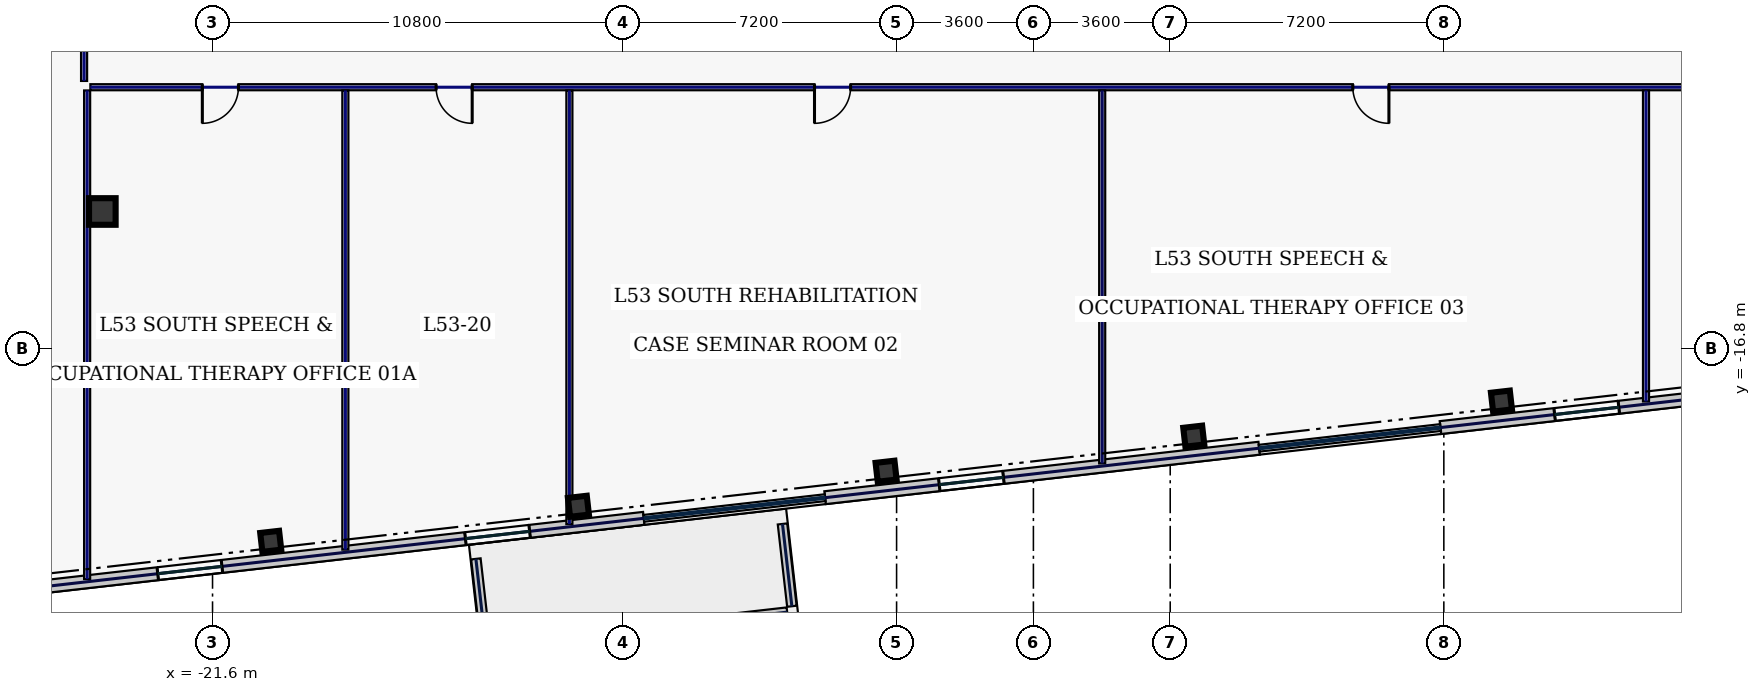
"""IFC4 building model, lengths in metres.
Left out: names, types, materials, properties, quantities, classifications, styles, units other than length and angle.
Written with IfcOpenShell. Run it as: python <this file> out.ifc"""

import sys

from ifc_helpers import new_model, si_unit, direction, frame, frame_2d, origin, origin_2d, place, context, subcontext, project, spatial, rectangle, hollow_rectangle, extrude, element, fill, save


model = new_model("IFC4")
c1 = context("Model", 3, precision=1e-05, world=origin(), true_north=direction((0.0, 1.0)))
c2 = subcontext(c1, "Body", "Model", "MODEL_VIEW")
j1 = project(units=[si_unit("LENGTHUNIT", "METRE"), si_unit("PLANEANGLEUNIT", "RADIAN")], contexts=[c1])
p1 = place(None, origin())
s1 = spatial("IfcSite", under=j1, at=p1, CompositionType="ELEMENT")
p2 = place(p1, origin())
s2 = spatial("IfcBuilding", under=s1, at=p2, CompositionType="ELEMENT")
p3 = place(p2, frame((0.0, 0.0, 230.2)))
s3 = spatial("IfcBuildingStorey", under=s2, at=p3, CompositionType="ELEMENT", Elevation=230.2)
p4 = place(p3, frame((-24.5, -13.2, 0.0), z_axis=(0.0, 0.0, 1.0), x_axis=(1.0, 0.0, 0.0)))
e1 = element("IfcColumn", 1, at=p4, inside=s3, PredefinedType="COLUMN", context=c2, shape_type="SweptSolid", body=[
    extrude(hollow_rectangle(XDim=0.7, YDim=0.7, WallThickness=0.032, at=origin_2d()), origin(), (0.0, 0.0, 1.0), 3.74),
])
for number, where, z_axis, x_axis in (
    (2, (-20.069, -21.88, 0.0), (0.0, 0.0, 1.0), (0.994, 0.113, 0.0)),
    (3, (-11.972, -20.958, 0.0), (0.0, 0.0, 1.0), (0.994, 0.113, 0.0)),
    (4, (-3.876, -20.035, 0.0), (0.0, 0.0, 1.0), (0.994, 0.113, 0.0)),
    (5, (4.22, -19.113, 0.0), (0.0, 0.0, 1.0), (0.994, 0.113, 0.0)),
    (6, (12.316, -18.19, 0.0), (0.0, 0.0, 1.0), (0.994, 0.113, 0.0)),
):
    element("IfcColumn", number, at=place(p3, frame(where, z_axis=z_axis, x_axis=x_axis)), inside=s3, PredefinedType="COLUMN", context=c2, shape_type="SweptSolid", body=[
        extrude(hollow_rectangle(XDim=0.5, YDim=0.5, WallThickness=0.025, at=origin_2d()), origin(), (0.0, 0.0, 1.0), 3.74),
    ])
p5 = place(p3, frame((-14.67, -22.342, 0.0), z_axis=(0.0, 0.0, 1.0), x_axis=(0.113221265394, -0.993569798787, 0.0)))
e7 = element("IfcWall", 7, at=p5, inside=s3, PredefinedType="PARAPET", context=c2, shape_type="SweptSolid", body=[
    extrude(rectangle(XDim=2.18, YDim=0.25, at=frame_2d((1.09, 0.0))), origin(), (0.0, 0.0, 1.0), 1.15),
])
p6 = place(p3, frame((-14.268, -24.631, 0.0), z_axis=(0.0, 0.0, 1.0), x_axis=(0.993572659553, 0.11319615801, 0.0)))
e8 = element("IfcWall", 8, at=p6, inside=s3, PredefinedType="PARAPET", context=c2, shape_type="SweptSolid", body=[
    extrude(rectangle(XDim=7.84, YDim=0.25, at=frame_2d((3.92, 0.0))), origin(), (0.0, 0.0, 1.0), 1.15),
])
p7 = place(p3, frame((-6.355, -23.589, 0.0), z_axis=(0.0, 0.0, 1.0), x_axis=(-0.113221265394, 0.993569798787, 0.0)))
e9 = element("IfcWall", 9, at=p7, inside=s3, PredefinedType="PARAPET", context=c2, shape_type="SweptSolid", body=[
    extrude(rectangle(XDim=2.18, YDim=0.25, at=frame_2d((1.09, 0.0))), origin(), (0.0, 0.0, 1.0), 1.15),
])
p8 = place(p3, frame((-28.783, -23.386, 0.0), z_axis=(0.0, 0.0, 1.0), x_axis=(0.993572271362, 0.113199565282, 0.0)))
e10 = element("IfcWall", 10, at=p8, inside=s3, PredefinedType="STANDARD", context=c2, shape_type="SweptSolid", body=[
    extrude(rectangle(XDim=18.651, YDim=0.34, at=frame_2d((9.326, 0.0))), origin(), (0.0, 0.0, 1.0), 3.74),
])
p9 = place(p8, frame((2.03, 0.0, 0.88)))
e11 = element("IfcOpeningElement", 11, at=p9, cuts=e10, PredefinedType="OPENING", context=c2, shape_type="SweptSolid", body=[
    extrude(rectangle(XDim=0.85, YDim=1.85, at=frame_2d((0.425, 0.925))), frame((0.0, 0.18, 0.0), z_axis=(0.0, -1.0, 0.0), x_axis=(1.0, 0.0, 0.0)), (0.0, 0.0, 1.0), 0.36),
])
p10 = place(p8, frame((5.779, 0.0, 0.88)))
e12 = element("IfcOpeningElement", 12, at=p10, cuts=e10, PredefinedType="OPENING", context=c2, shape_type="SweptSolid", body=[
    extrude(rectangle(XDim=1.7, YDim=1.95, at=frame_2d((0.85, 0.975))), frame((0.0, 0.18, 0.0), z_axis=(0.0, -1.0, 0.0), x_axis=(1.0, 0.0, 0.0)), (0.0, 0.0, 1.0), 0.36),
])
p11 = place(p8, frame((13.927, 0.0, 0.88)))
e13 = element("IfcOpeningElement", 13, at=p11, cuts=e10, PredefinedType="OPENING", context=c2, shape_type="SweptSolid", body=[
    extrude(rectangle(XDim=1.7, YDim=1.95, at=frame_2d((0.85, 0.975))), frame((0.0, 0.18, 0.0), z_axis=(0.0, -1.0, 0.0), x_axis=(1.0, 0.0, 0.0)), (0.0, 0.0, 1.0), 0.36),
])
p12 = place(p3, frame((-5.482, -20.731, 0.0), z_axis=(0.0, 0.0, 1.0), x_axis=(0.993571968199, 0.113202226169, 0.0)))
e14 = element("IfcWall", 14, at=p12, inside=s3, PredefinedType="STANDARD", context=c2, shape_type="SweptSolid", body=[
    extrude(rectangle(XDim=11.497, YDim=0.34, at=frame_2d((5.749, 0.0))), origin(), (0.0, 0.0, 1.0), 3.74),
])
p13 = place(p12, frame((3.024, 0.0, 0.88)))
e15 = element("IfcOpeningElement", 15, at=p13, cuts=e14, PredefinedType="OPENING", context=c2, shape_type="SweptSolid", body=[
    extrude(rectangle(XDim=1.7, YDim=1.95, at=frame_2d((0.85, 0.975))), frame((0.0, 0.18, 0.0), z_axis=(0.0, -1.0, 0.0), x_axis=(1.0, 0.0, 0.0)), (0.0, 0.0, 1.0), 0.36),
])
p14 = place(p3, frame((10.71, -18.886, 0.0), z_axis=(0.0, 0.0, 1.0), x_axis=(0.993572271362, 0.113199565282, 0.0)))
e16 = element("IfcWall", 16, at=p14, inside=s3, PredefinedType="STANDARD", context=c2, shape_type="SweptSolid", body=[
    extrude(rectangle(XDim=18.651, YDim=0.34, at=frame_2d((9.326, 0.0))), origin(), (0.0, 0.0, 1.0), 3.74),
])
p15 = place(p14, frame((3.024, 0.0, 0.88)))
e17 = element("IfcOpeningElement", 17, at=p15, cuts=e16, PredefinedType="OPENING", context=c2, shape_type="SweptSolid", body=[
    extrude(rectangle(XDim=1.7, YDim=1.95, at=frame_2d((0.85, 0.975))), frame((0.0, 0.18, 0.0), z_axis=(0.0, -1.0, 0.0), x_axis=(1.0, 0.0, 0.0)), (0.0, 0.0, 1.0), 0.36),
])
p16 = place(p14, frame((6.773, 0.0, 0.88)))
e18 = element("IfcOpeningElement", 18, at=p16, cuts=e16, PredefinedType="OPENING", context=c2, shape_type="SweptSolid", body=[
    extrude(rectangle(XDim=1.7, YDim=1.95, at=frame_2d((0.85, 0.975))), frame((0.0, 0.18, 0.0), z_axis=(0.0, -1.0, 0.0), x_axis=(1.0, 0.0, 0.0)), (0.0, 0.0, 1.0), 0.36),
])
p17 = place(p14, frame((11.173, 0.0, 0.88)))
e19 = element("IfcOpeningElement", 19, at=p17, cuts=e16, PredefinedType="OPENING", context=c2, shape_type="SweptSolid", body=[
    extrude(rectangle(XDim=1.7, YDim=1.95, at=frame_2d((0.85, 0.975))), frame((0.0, 0.18, 0.0), z_axis=(0.0, -1.0, 0.0), x_axis=(1.0, 0.0, 0.0)), (0.0, 0.0, 1.0), 0.36),
])
p18 = place(p14, frame((14.921, 0.0, 0.88)))
e20 = element("IfcOpeningElement", 20, at=p18, cuts=e16, PredefinedType="OPENING", context=c2, shape_type="SweptSolid", body=[
    extrude(rectangle(XDim=1.7, YDim=1.95, at=frame_2d((0.85, 0.975))), frame((0.0, 0.18, 0.0), z_axis=(0.0, -1.0, 0.0), x_axis=(1.0, 0.0, 0.0)), (0.0, 0.0, 1.0), 0.36),
])
p19 = place(p3, frame((-24.98, -9.765, 0.0), z_axis=(0.0, 0.0, 1.0), x_axis=(0.0, 1.0, 0.0)))
e21 = element("IfcWall", 21, at=p19, inside=s3, PredefinedType="PARTITIONING", context=c2, shape_type="SweptSolid", body=[
    extrude(rectangle(XDim=2.98, YDim=0.16, at=frame_2d((1.49, 0.0))), origin(), (0.0, 0.0, 1.0), 3.74),
])
p20 = place(p19, frame((1.1, 0.0, 0.0)))
e22 = element("IfcOpeningElement", 22, at=p20, cuts=e21, PredefinedType="OPENING", context=c2, shape_type="SweptSolid", body=[
    extrude(rectangle(XDim=0.95, YDim=2.2, at=frame_2d((0.475, 1.1))), frame((0.0, 0.09, 0.0), z_axis=(0.0, -1.0, 0.0), x_axis=(1.0, 0.0, 0.0)), (0.0, 0.0, 1.0), 0.18),
])
p21 = place(p3, frame((24.815, -9.93, 0.0), z_axis=(0.0, 0.0, 1.0), x_axis=(-1.0, 0.0, 0.0)))
e23 = element("IfcWall", 23, at=p21, inside=s3, PredefinedType="PARTITIONING", context=c2, shape_type="SweptSolid", body=[
    extrude(rectangle(XDim=49.63, YDim=0.16, at=frame_2d((24.815, 0.0))), origin(), (0.0, 0.0, 1.0), 3.74),
])
p22 = place(p21, frame((45.733, 0.0, 0.0)))
e24 = element("IfcOpeningElement", 24, at=p22, cuts=e23, PredefinedType="OPENING", context=c2, shape_type="SweptSolid", body=[
    extrude(rectangle(XDim=0.95, YDim=2.2, at=frame_2d((0.475, 1.1))), frame((0.0, 0.09, 0.0), z_axis=(0.0, -1.0, 0.0), x_axis=(1.0, 0.0, 0.0)), (0.0, 0.0, 1.0), 0.18),
])
p23 = place(p21, frame((39.583, 0.0, 0.0)))
e25 = element("IfcOpeningElement", 25, at=p23, cuts=e23, PredefinedType="OPENING", context=c2, shape_type="SweptSolid", body=[
    extrude(rectangle(XDim=0.95, YDim=2.2, at=frame_2d((0.475, 1.1))), frame((0.0, 0.09, 0.0), z_axis=(0.0, -1.0, 0.0), x_axis=(1.0, 0.0, 0.0)), (0.0, 0.0, 1.0), 0.18),
])
p24 = place(p21, frame((29.625, 0.0, 0.0)))
e26 = element("IfcOpeningElement", 26, at=p24, cuts=e23, PredefinedType="OPENING", context=c2, shape_type="SweptSolid", body=[
    extrude(rectangle(XDim=0.95, YDim=2.2, at=frame_2d((0.475, 1.1))), frame((0.0, 0.09, 0.0), z_axis=(0.0, -1.0, 0.0), x_axis=(1.0, 0.0, 0.0)), (0.0, 0.0, 1.0), 0.18),
])
p25 = place(p21, frame((15.46, 0.0, 0.0)))
e27 = element("IfcOpeningElement", 27, at=p25, cuts=e23, PredefinedType="OPENING", context=c2, shape_type="SweptSolid", body=[
    extrude(rectangle(XDim=0.95, YDim=2.2, at=frame_2d((0.475, 1.1))), frame((0.0, 0.09, 0.0), z_axis=(0.0, -1.0, 0.0), x_axis=(1.0, 0.0, 0.0)), (0.0, 0.0, 1.0), 0.18),
])
p26 = place(p21, frame((4.109, 0.0, 0.0)))
e28 = element("IfcOpeningElement", 28, at=p26, cuts=e23, PredefinedType="OPENING", context=c2, shape_type="SweptSolid", body=[
    extrude(rectangle(XDim=1.05, YDim=2.2, at=frame_2d((0.525, 1.1))), frame((0.0, 0.09, 0.0), z_axis=(0.0, -1.0, 0.0), x_axis=(1.0, 0.0, 0.0)), (0.0, 0.0, 1.0), 0.18),
])
p27 = place(p3, frame((-24.9, -22.873, 0.0), z_axis=(0.0, 0.0, 1.0), x_axis=(0.0, 1.0, 0.0)))
e29 = element("IfcWall", 29, at=p27, inside=s3, PredefinedType="PARTITIONING", context=c2, shape_type="SweptSolid", body=[
    extrude(rectangle(XDim=12.858, YDim=0.16, at=frame_2d((6.429, 0.0))), origin(), (0.0, 0.0, 1.0), 3.74),
])
p28 = place(p3, frame((-12.21, -21.427, 0.0), z_axis=(0.0, 0.0, 1.0), x_axis=(0.0, 1.0, 0.0)))
e30 = element("IfcWall", 30, at=p28, inside=s3, PredefinedType="PARTITIONING", context=c2, shape_type="SweptSolid", body=[
    extrude(rectangle(XDim=11.413, YDim=0.16, at=frame_2d((5.706, 0.0))), origin(), (0.0, 0.0, 1.0), 3.74),
])
p29 = place(p3, frame((1.81, -19.83, 0.0), z_axis=(0.0, 0.0, 1.0), x_axis=(0.0, 1.0, 0.0)))
e31 = element("IfcWall", 31, at=p29, inside=s3, PredefinedType="PARTITIONING", context=c2, shape_type="SweptSolid", body=[
    extrude(rectangle(XDim=9.815, YDim=0.16, at=frame_2d((4.908, 0.0))), origin(), (0.0, 0.0, 1.0), 3.165),
])
p30 = place(p3, frame((16.12, -18.2, 0.0), z_axis=(0.0, 0.0, 1.0), x_axis=(0.0, 1.0, 0.0)))
e32 = element("IfcWall", 32, at=p30, inside=s3, PredefinedType="PARTITIONING", context=c2, shape_type="SweptSolid", body=[
    extrude(rectangle(XDim=8.185, YDim=0.16, at=frame_2d((4.092, 0.0))), origin(), (0.0, 0.0, 1.0), 3.74),
])
p31 = place(p3, frame((-18.105, -22.099, 0.0), z_axis=(0.0, 0.0, 1.0), x_axis=(0.0, 1.0, 0.0)))
e33 = element("IfcWall", 33, at=p31, inside=s3, PredefinedType="PARTITIONING", context=c2, shape_type="SweptSolid", body=[
    extrude(rectangle(XDim=12.084, YDim=0.16, at=frame_2d((6.042, 0.0))), origin(), (0.0, 0.0, 1.0), 3.74),
])
p32 = place(p10, origin())
e34 = element("IfcWindow", 34, at=p32, inside=s3, PartitioningType="SINGLE_PANEL", PredefinedType="WINDOW", context=c2, shape_type="SweptSolid", body=[
    extrude(rectangle(XDim=1.7, YDim=1.95, at=frame_2d((0.85, 0.975))), frame((0.0, 0.03, 0.0), z_axis=(0.0, -1.0, 0.0), x_axis=(1.0, 0.0, 0.0)), (0.0, 0.0, 1.0), 0.06),
])
fill(e12, e34)
p33 = place(p11, origin())
e35 = element("IfcWindow", 35, at=p33, inside=s3, PartitioningType="SINGLE_PANEL", PredefinedType="WINDOW", context=c2, shape_type="SweptSolid", body=[
    extrude(rectangle(XDim=1.7, YDim=1.95, at=frame_2d((0.85, 0.975))), frame((0.0, 0.03, 0.0), z_axis=(0.0, -1.0, 0.0), x_axis=(1.0, 0.0, 0.0)), (0.0, 0.0, 1.0), 0.06),
])
fill(e13, e35)
p34 = place(p13, origin())
e36 = element("IfcWindow", 36, at=p34, inside=s3, PartitioningType="SINGLE_PANEL", PredefinedType="WINDOW", context=c2, shape_type="SweptSolid", body=[
    extrude(rectangle(XDim=1.7, YDim=1.95, at=frame_2d((0.85, 0.975))), frame((0.0, 0.03, 0.0), z_axis=(0.0, -1.0, 0.0), x_axis=(1.0, 0.0, 0.0)), (0.0, 0.0, 1.0), 0.06),
])
fill(e15, e36)
p35 = place(p15, origin())
e37 = element("IfcWindow", 37, at=p35, inside=s3, PartitioningType="SINGLE_PANEL", PredefinedType="WINDOW", context=c2, shape_type="SweptSolid", body=[
    extrude(rectangle(XDim=1.7, YDim=1.95, at=frame_2d((0.85, 0.975))), frame((0.0, 0.03, 0.0), z_axis=(0.0, -1.0, 0.0), x_axis=(1.0, 0.0, 0.0)), (0.0, 0.0, 1.0), 0.06),
])
fill(e17, e37)
p36 = place(p22, origin())
e38 = element("IfcDoor", 38, at=p36, inside=s3, OperationType="SINGLE_SWING_RIGHT", PredefinedType="DOOR", context=c2, shape_type="SweptSolid", body=[
    extrude(rectangle(XDim=0.95, YDim=2.2, at=frame_2d((0.475, 1.1))), frame((0.0, 0.025, 0.0), z_axis=(0.0, -1.0, 0.0), x_axis=(1.0, 0.0, 0.0)), (0.0, 0.0, 1.0), 0.05),
])
fill(e24, e38)
p37 = place(p23, origin())
e39 = element("IfcDoor", 39, at=p37, inside=s3, OperationType="SINGLE_SWING_LEFT", PredefinedType="DOOR", context=c2, shape_type="SweptSolid", body=[
    extrude(rectangle(XDim=0.95, YDim=2.2, at=frame_2d((0.475, 1.1))), frame((0.0, 0.025, 0.0), z_axis=(0.0, -1.0, 0.0), x_axis=(1.0, 0.0, 0.0)), (0.0, 0.0, 1.0), 0.05),
])
fill(e25, e39)
p38 = place(p24, origin())
e40 = element("IfcDoor", 40, at=p38, inside=s3, OperationType="SINGLE_SWING_RIGHT", PredefinedType="DOOR", context=c2, shape_type="SweptSolid", body=[
    extrude(rectangle(XDim=0.95, YDim=2.2, at=frame_2d((0.475, 1.1))), frame((0.0, 0.025, 0.0), z_axis=(0.0, -1.0, 0.0), x_axis=(1.0, 0.0, 0.0)), (0.0, 0.0, 1.0), 0.05),
])
fill(e26, e40)
p39 = place(p25, origin())
e41 = element("IfcDoor", 41, at=p39, inside=s3, OperationType="SINGLE_SWING_LEFT", PredefinedType="DOOR", context=c2, shape_type="SweptSolid", body=[
    extrude(rectangle(XDim=0.95, YDim=2.2, at=frame_2d((0.475, 1.1))), frame((0.0, 0.025, 0.0), z_axis=(0.0, -1.0, 0.0), x_axis=(1.0, 0.0, 0.0)), (0.0, 0.0, 1.0), 0.05),
])
fill(e27, e41)
save(model, sys.argv[1])
